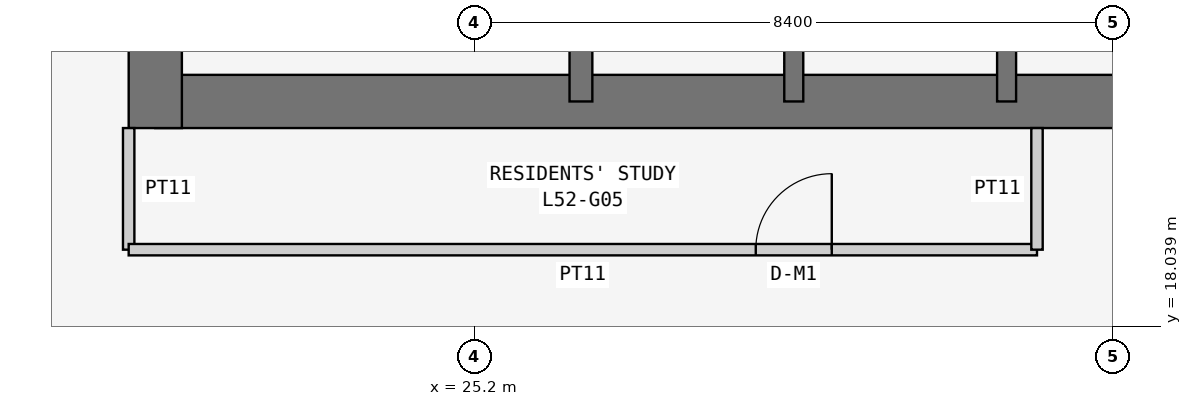
"""IFC4 building model, lengths in metres.
Left out: names, types, materials, properties, quantities, classifications, styles, units other than length and angle.
Written with IfcOpenShell. Run it as: python <this file> out.ifc"""

import sys

from ifc_helpers import new_model, si_unit, direction, frame, frame_2d, origin, place, context, subcontext, project, spatial, rectangle, extrude, element, fill, save


model = new_model("IFC4")
c1 = context("Model", 3, precision=1e-05, world=origin(), true_north=direction((0.0, 1.0)))
c2 = subcontext(c1, "Body", "Model", "MODEL_VIEW")
j1 = project(units=[si_unit("LENGTHUNIT", "METRE"), si_unit("PLANEANGLEUNIT", "RADIAN")], contexts=[c1])
p1 = place(None, origin())
s1 = spatial("IfcSite", under=j1, at=p1, CompositionType="ELEMENT")
p2 = place(p1, origin())
s2 = spatial("IfcBuilding", under=s1, at=p2, CompositionType="ELEMENT")
p3 = place(p2, frame((0.0, 0.0, 201.3)))
s3 = spatial("IfcBuildingStorey", under=s2, at=p3, CompositionType="ELEMENT", Elevation=201.3)
p4 = place(p3, frame((21.0, 21.0, 0.0), z_axis=(0.0, 0.0, 1.0), x_axis=(1.0, 0.0, 0.0)))
e1 = element("IfcWall", 1, at=p4, inside=s3, PredefinedType="SHEAR", context=c2, shape_type="SweptSolid", body=[
    extrude(rectangle(XDim=17.15, YDim=0.7, at=frame_2d((8.575, 0.0))), origin(), (0.0, 0.0, 1.0), 3.6),
])
p5 = place(p3, frame((21.0, 37.8, 0.0), z_axis=(0.0, 0.0, 1.0), x_axis=(0.0, -1.0, 0.0)))
e2 = element("IfcWall", 2, at=p5, inside=s3, PredefinedType="SHEAR", context=c2, shape_type="SweptSolid", body=[
    extrude(rectangle(XDim=17.15, YDim=0.7, at=frame_2d((8.575, 0.0))), origin(), (0.0, 0.0, 1.0), 3.6),
])
p6 = place(p5, frame((5.4, 0.0, 0.0)))
e3 = element("IfcOpeningElement", 3, at=p6, cuts=e2, PredefinedType="OPENING", context=c2, shape_type="SweptSolid", body=[
    extrude(rectangle(XDim=1.2, YDim=2.1, at=frame_2d((0.6, 1.05))), frame((0.0, 0.36, 0.0), z_axis=(0.0, -1.0, 0.0), x_axis=(1.0, 0.0, 0.0)), (0.0, 0.0, 1.0), 0.72),
])
p7 = place(p3, frame((26.6, 21.0, 0.0), z_axis=(0.0, 0.0, 1.0), x_axis=(0.0, 1.0, 0.0)))
e4 = element("IfcWall", 4, at=p7, inside=s3, PredefinedType="SHEAR", context=c2, shape_type="SweptSolid", body=[
    extrude(rectangle(XDim=16.8, YDim=0.3, at=frame_2d((8.4, 0.0))), origin(), (0.0, 0.0, 1.0), 3.6),
])
p8 = place(p7, frame((10.4, 0.0, 0.0)))
e5 = element("IfcOpeningElement", 5, at=p8, cuts=e4, PredefinedType="OPENING", context=c2, shape_type="SweptSolid", body=[
    extrude(rectangle(XDim=1.2, YDim=2.1, at=frame_2d((0.6, 1.05))), frame((0.0, 0.16, 0.0), z_axis=(0.0, -1.0, 0.0), x_axis=(1.0, 0.0, 0.0)), (0.0, 0.0, 1.0), 0.32),
])
for number, where, z_axis, x_axis in (
    (6, (29.4, 21.0, 0.0), (0.0, 0.0, 1.0), (0.0, 1.0, 0.0)),
    (7, (32.2, 21.0, 0.0), (0.0, 0.0, 1.0), (0.0, 1.0, 0.0)),
):
    element("IfcWall", number, at=place(p3, frame(where, z_axis=z_axis, x_axis=x_axis)), inside=s3, PredefinedType="SHEAR", context=c2, shape_type="SweptSolid", body=[
        extrude(rectangle(XDim=3.2, YDim=0.25, at=frame_2d((1.6, 0.0))), origin(), (0.0, 0.0, 1.0), 3.6),
    ])
p9 = place(p3, frame((20.65, 20.65, 0.0), z_axis=(0.0, 0.0, 1.0), x_axis=(0.0, -1.0, 0.0)))
e8 = element("IfcWall", 8, at=p9, inside=s3, PredefinedType="PARTITIONING", context=c2, shape_type="SweptSolid", body=[
    extrude(rectangle(XDim=1.6, YDim=0.15, at=frame_2d((0.8, 0.0))), origin(), (0.0, 0.0, 1.0), 3.45),
])
p10 = place(p3, frame((20.65, 19.05, 0.0), z_axis=(0.0, 0.0, 1.0), x_axis=(1.0, 0.0, 0.0)))
e9 = element("IfcWall", 9, at=p10, inside=s3, PredefinedType="PARTITIONING", context=c2, shape_type="SweptSolid", body=[
    extrude(rectangle(XDim=11.95, YDim=0.15, at=frame_2d((5.975, 0.0))), origin(), (0.0, 0.0, 1.0), 3.45),
])
p11 = place(p10, frame((8.25, 0.0, 0.0)))
e10 = element("IfcOpeningElement", 10, at=p11, cuts=e9, PredefinedType="OPENING", context=c2, shape_type="SweptSolid", body=[
    extrude(rectangle(XDim=1.0, YDim=2.1, at=frame_2d((0.5, 1.05))), frame((0.0, 0.085, 0.0), z_axis=(0.0, -1.0, 0.0), x_axis=(1.0, 0.0, 0.0)), (0.0, 0.0, 1.0), 0.17),
])
p12 = place(p3, frame((32.6, 19.05, 0.0), z_axis=(0.0, 0.0, 1.0), x_axis=(0.0, 1.0, 0.0)))
e11 = element("IfcWall", 11, at=p12, inside=s3, PredefinedType="PARTITIONING", context=c2, shape_type="SweptSolid", body=[
    extrude(rectangle(XDim=1.6, YDim=0.15, at=frame_2d((0.8, 0.0))), origin(), (0.0, 0.0, 1.0), 3.45),
])
p13 = place(p11, origin())
e12 = element("IfcDoor", 12, at=p13, inside=s3, OperationType="SINGLE_SWING_RIGHT", PredefinedType="DOOR", context=c2, shape_type="SweptSolid", body=[
    extrude(rectangle(XDim=1.0, YDim=2.1, at=frame_2d((0.5, 1.05))), frame((0.0, 0.025, 0.0), z_axis=(0.0, -1.0, 0.0), x_axis=(1.0, 0.0, 0.0)), (0.0, 0.0, 1.0), 0.05),
])
fill(e10, e12)
save(model, sys.argv[1])
